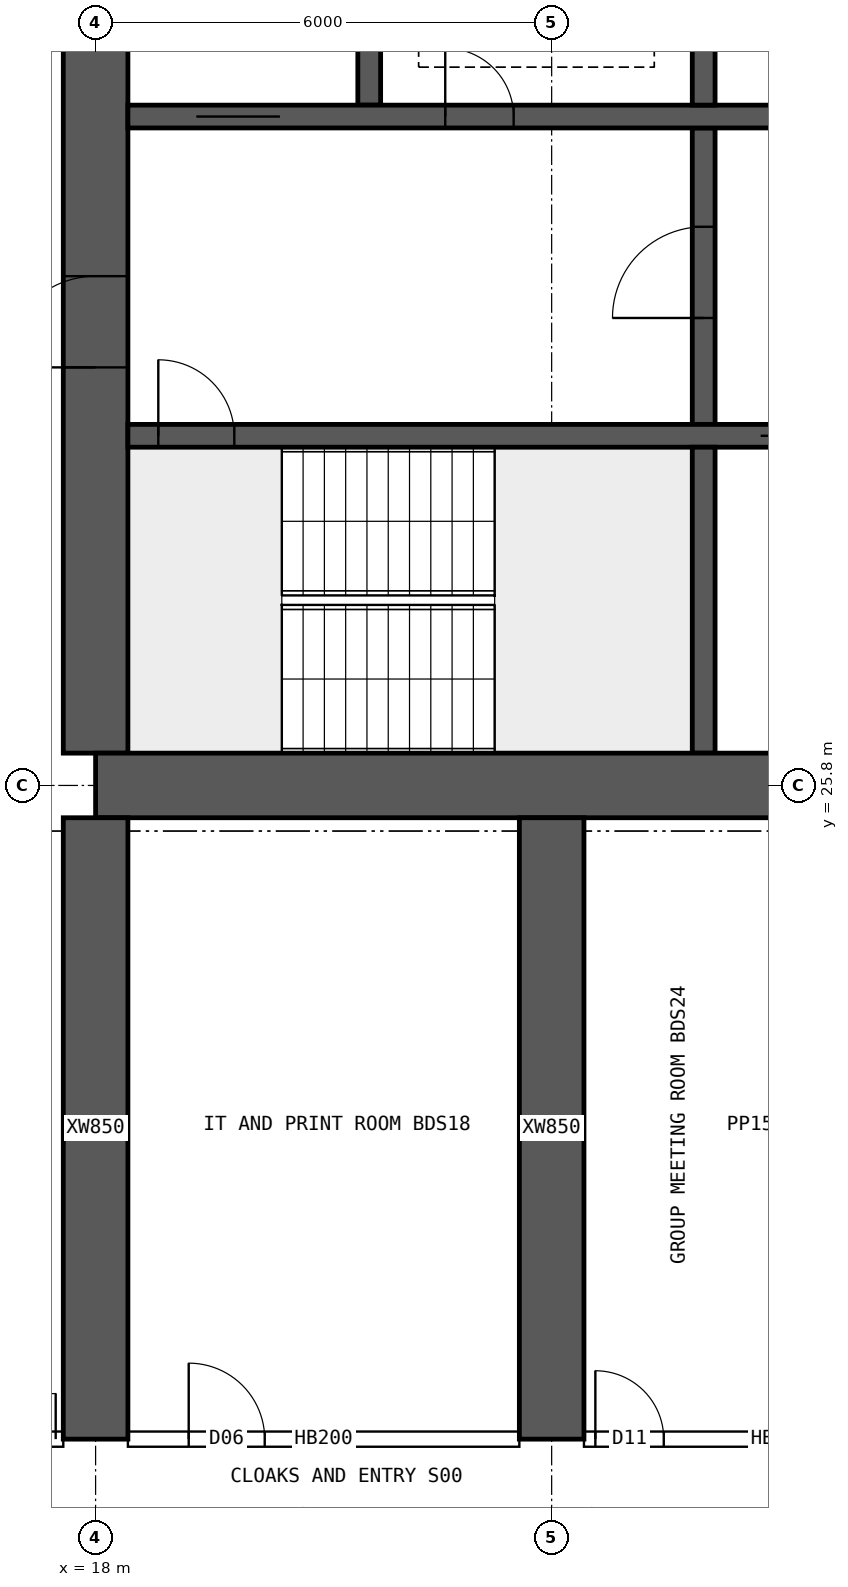
"""IFC4 building model, lengths in metres.
Left out: names, types, materials, properties, quantities, classifications, styles, units other than length and angle.
Written with IfcOpenShell. Run it as: python <this file> out.ifc"""

import sys

from ifc_helpers import new_model, si_unit, direction, frame, frame_2d, origin, place, context, subcontext, project, spatial, rectangle, extrude, element, fill, save


model = new_model("IFC4")
c1 = context("Model", 3, precision=1e-05, world=origin(), true_north=direction((0.0, 1.0)))
c2 = subcontext(c1, "Body", "Model", "MODEL_VIEW")
j1 = project(units=[si_unit("LENGTHUNIT", "METRE"), si_unit("PLANEANGLEUNIT", "RADIAN")], contexts=[c1])
p1 = place(None, origin())
s1 = spatial("IfcSite", under=j1, at=p1, CompositionType="ELEMENT")
p2 = place(p1, origin())
s2 = spatial("IfcBuilding", under=s1, at=p2, CompositionType="ELEMENT")
p3 = place(p2, frame((0.0, 0.0, 163.6)))
s3 = spatial("IfcBuildingStorey", under=s2, at=p3, CompositionType="ELEMENT", Elevation=163.6)
p4 = place(p3, frame((18.0, 25.8, 0.0), z_axis=(0.0, 0.0, 1.0), x_axis=(1.0, 0.0, 0.0)))
e1 = element("IfcWall", 1, at=p4, inside=s3, PredefinedType="SHEAR", context=c2, shape_type="SweptSolid", body=[
    extrude(rectangle(XDim=48.0, YDim=0.85, at=frame_2d((24.0, 0.0))), origin(), (0.0, 0.0, 1.0), 3.75),
])
p5 = place(p3, frame((18.0, 26.225, 0.0), z_axis=(0.0, 0.0, 1.0), x_axis=(0.0, 1.0, 0.0)))
e2 = element("IfcWall", 2, at=p5, inside=s3, PredefinedType="SHEAR", context=c2, shape_type="SweptSolid", body=[
    extrude(rectangle(XDim=11.55, YDim=0.85, at=frame_2d((5.775, 0.0))), origin(), (0.0, 0.0, 1.0), 3.75),
])
p6 = place(p5, frame((5.075, 0.0, 0.0)))
e3 = element("IfcOpeningElement", 3, at=p6, cuts=e2, PredefinedType="OPENING", context=c2, shape_type="SweptSolid", body=[
    extrude(rectangle(XDim=1.2, YDim=2.1, at=frame_2d((0.6, 1.05))), frame((0.0, 0.435, 0.0), z_axis=(0.0, -1.0, 0.0), x_axis=(1.0, 0.0, 0.0)), (0.0, 0.0, 1.0), 0.87),
])
p7 = place(p3, frame((18.425, 30.4, 0.0), z_axis=(0.0, 0.0, 1.0), x_axis=(1.0, 0.0, 0.0)))
e4 = element("IfcWall", 4, at=p7, inside=s3, PredefinedType="SHEAR", context=c2, shape_type="SweptSolid", body=[
    extrude(rectangle(XDim=47.15, YDim=0.3, at=frame_2d((23.575, 0.0))), origin(), (0.0, 0.0, 1.0), 3.75),
])
p8 = place(p7, frame((0.4, 0.0, 0.0)))
e5 = element("IfcOpeningElement", 5, at=p8, cuts=e4, PredefinedType="OPENING", context=c2, shape_type="SweptSolid", body=[
    extrude(rectangle(XDim=1.0, YDim=2.1, at=frame_2d((0.5, 1.05))), frame((0.0, 0.16, 0.0), z_axis=(0.0, -1.0, 0.0), x_axis=(1.0, 0.0, 0.0)), (0.0, 0.0, 1.0), 0.32),
])
p9 = place(p7, frame((45.75, 0.0, 0.0)))
e6 = element("IfcOpeningElement", 6, at=p9, cuts=e4, PredefinedType="OPENING", context=c2, shape_type="SweptSolid", body=[
    extrude(rectangle(XDim=1.0, YDim=2.1, at=frame_2d((0.5, 1.05))), frame((0.0, 0.16, 0.0), z_axis=(0.0, -1.0, 0.0), x_axis=(1.0, 0.0, 0.0)), (0.0, 0.0, 1.0), 0.32),
])
p10 = place(p7, frame((8.325, 0.0, 0.0)))
e7 = element("IfcOpeningElement", 7, at=p10, cuts=e4, PredefinedType="OPENING", context=c2, shape_type="SweptSolid", body=[
    extrude(rectangle(XDim=1.1, YDim=2.1, at=frame_2d((0.55, 1.05))), frame((0.0, 0.16, 0.0), z_axis=(0.0, -1.0, 0.0), x_axis=(1.0, 0.0, 0.0)), (0.0, 0.0, 1.0), 0.32),
])
p11 = place(p7, frame((10.925, 0.0, 0.0)))
e8 = element("IfcOpeningElement", 8, at=p11, cuts=e4, PredefinedType="OPENING", context=c2, shape_type="SweptSolid", body=[
    extrude(rectangle(XDim=1.1, YDim=2.1, at=frame_2d((0.55, 1.05))), frame((0.0, 0.16, 0.0), z_axis=(0.0, -1.0, 0.0), x_axis=(1.0, 0.0, 0.0)), (0.0, 0.0, 1.0), 0.32),
])
p12 = place(p7, frame((13.525, 0.0, 0.0)))
e9 = element("IfcOpeningElement", 9, at=p12, cuts=e4, PredefinedType="OPENING", context=c2, shape_type="SweptSolid", body=[
    extrude(rectangle(XDim=1.1, YDim=2.1, at=frame_2d((0.55, 1.05))), frame((0.0, 0.16, 0.0), z_axis=(0.0, -1.0, 0.0), x_axis=(1.0, 0.0, 0.0)), (0.0, 0.0, 1.0), 0.32),
])
p13 = place(p7, frame((16.125, 0.0, 0.0)))
e10 = element("IfcOpeningElement", 10, at=p13, cuts=e4, PredefinedType="OPENING", context=c2, shape_type="SweptSolid", body=[
    extrude(rectangle(XDim=1.1, YDim=2.1, at=frame_2d((0.55, 1.05))), frame((0.0, 0.16, 0.0), z_axis=(0.0, -1.0, 0.0), x_axis=(1.0, 0.0, 0.0)), (0.0, 0.0, 1.0), 0.32),
])
p14 = place(p7, frame((18.9, 0.0, 0.0)))
e11 = element("IfcOpeningElement", 11, at=p14, cuts=e4, PredefinedType="OPENING", context=c2, shape_type="SweptSolid", body=[
    extrude(rectangle(XDim=0.9, YDim=2.1, at=frame_2d((0.45, 1.05))), frame((0.0, 0.16, 0.0), z_axis=(0.0, -1.0, 0.0), x_axis=(1.0, 0.0, 0.0)), (0.0, 0.0, 1.0), 0.32),
])
p15 = place(p7, frame((30.192, 0.0, 0.0)))
e12 = element("IfcOpeningElement", 12, at=p15, cuts=e4, PredefinedType="OPENING", context=c2, shape_type="SweptSolid", body=[
    extrude(rectangle(XDim=1.1, YDim=2.1, at=frame_2d((0.55, 1.05))), frame((0.0, 0.16, 0.0), z_axis=(0.0, -1.0, 0.0), x_axis=(1.0, 0.0, 0.0)), (0.0, 0.0, 1.0), 0.32),
])
p16 = place(p7, frame((33.725, 0.0, 0.0)))
e13 = element("IfcOpeningElement", 13, at=p16, cuts=e4, PredefinedType="OPENING", context=c2, shape_type="SweptSolid", body=[
    extrude(rectangle(XDim=1.1, YDim=2.1, at=frame_2d((0.55, 1.05))), frame((0.0, 0.16, 0.0), z_axis=(0.0, -1.0, 0.0), x_axis=(1.0, 0.0, 0.0)), (0.0, 0.0, 1.0), 0.32),
])
p17 = place(p7, frame((37.258, 0.0, 0.0)))
e14 = element("IfcOpeningElement", 14, at=p17, cuts=e4, PredefinedType="OPENING", context=c2, shape_type="SweptSolid", body=[
    extrude(rectangle(XDim=1.1, YDim=2.1, at=frame_2d((0.55, 1.05))), frame((0.0, 0.16, 0.0), z_axis=(0.0, -1.0, 0.0), x_axis=(1.0, 0.0, 0.0)), (0.0, 0.0, 1.0), 0.32),
])
p18 = place(p3, frame((18.425, 34.6, 0.0), z_axis=(0.0, 0.0, 1.0), x_axis=(1.0, 0.0, 0.0)))
e15 = element("IfcWall", 15, at=p18, inside=s3, PredefinedType="SHEAR", context=c2, shape_type="SweptSolid", body=[
    extrude(rectangle(XDim=47.15, YDim=0.3, at=frame_2d((23.575, 0.0))), origin(), (0.0, 0.0, 1.0), 3.75),
])
p19 = place(p18, frame((0.9, 0.0, 0.0)))
e16 = element("IfcOpeningElement", 16, at=p19, cuts=e15, PredefinedType="OPENING", context=c2, shape_type="SweptSolid", body=[
    extrude(rectangle(XDim=1.1, YDim=2.1, at=frame_2d((0.55, 1.05))), frame((0.0, 0.16, 0.0), z_axis=(0.0, -1.0, 0.0), x_axis=(1.0, 0.0, 0.0)), (0.0, 0.0, 1.0), 0.32),
])
p20 = place(p18, frame((45.15, 0.0, 0.0)))
e17 = element("IfcOpeningElement", 17, at=p20, cuts=e15, PredefinedType="OPENING", context=c2, shape_type="SweptSolid", body=[
    extrude(rectangle(XDim=1.1, YDim=2.1, at=frame_2d((0.55, 1.05))), frame((0.0, 0.16, 0.0), z_axis=(0.0, -1.0, 0.0), x_axis=(1.0, 0.0, 0.0)), (0.0, 0.0, 1.0), 0.32),
])
p21 = place(p18, frame((4.175, 0.0, 0.0)))
e18 = element("IfcOpeningElement", 18, at=p21, cuts=e15, PredefinedType="OPENING", context=c2, shape_type="SweptSolid", body=[
    extrude(rectangle(XDim=0.9, YDim=2.1, at=frame_2d((0.45, 1.05))), frame((0.0, 0.16, 0.0), z_axis=(0.0, -1.0, 0.0), x_axis=(1.0, 0.0, 0.0)), (0.0, 0.0, 1.0), 0.32),
])
p22 = place(p18, frame((42.075, 0.0, 0.0)))
e19 = element("IfcOpeningElement", 19, at=p22, cuts=e15, PredefinedType="OPENING", context=c2, shape_type="SweptSolid", body=[
    extrude(rectangle(XDim=0.9, YDim=2.1, at=frame_2d((0.45, 1.05))), frame((0.0, 0.16, 0.0), z_axis=(0.0, -1.0, 0.0), x_axis=(1.0, 0.0, 0.0)), (0.0, 0.0, 1.0), 0.32),
])
p23 = place(p18, frame((8.95, 0.0, 0.0)))
e20 = element("IfcOpeningElement", 20, at=p23, cuts=e15, PredefinedType="OPENING", context=c2, shape_type="SweptSolid", body=[
    extrude(rectangle(XDim=0.9, YDim=2.1, at=frame_2d((0.45, 1.05))), frame((0.0, 0.16, 0.0), z_axis=(0.0, -1.0, 0.0), x_axis=(1.0, 0.0, 0.0)), (0.0, 0.0, 1.0), 0.32),
])
p24 = place(p18, frame((12.924, 0.0, 0.0)))
e21 = element("IfcOpeningElement", 21, at=p24, cuts=e15, PredefinedType="OPENING", context=c2, shape_type="SweptSolid", body=[
    extrude(rectangle(XDim=0.9, YDim=2.1, at=frame_2d((0.45, 1.05))), frame((0.0, 0.16, 0.0), z_axis=(0.0, -1.0, 0.0), x_axis=(1.0, 0.0, 0.0)), (0.0, 0.0, 1.0), 0.32),
])
p25 = place(p18, frame((16.571, 0.0, 0.0)))
e22 = element("IfcOpeningElement", 22, at=p25, cuts=e15, PredefinedType="OPENING", context=c2, shape_type="SweptSolid", body=[
    extrude(rectangle(XDim=0.9, YDim=2.1, at=frame_2d((0.45, 1.05))), frame((0.0, 0.16, 0.0), z_axis=(0.0, -1.0, 0.0), x_axis=(1.0, 0.0, 0.0)), (0.0, 0.0, 1.0), 0.32),
])
p26 = place(p18, frame((20.33, 0.0, 0.0)))
e23 = element("IfcOpeningElement", 23, at=p26, cuts=e15, PredefinedType="OPENING", context=c2, shape_type="SweptSolid", body=[
    extrude(rectangle(XDim=0.9, YDim=2.1, at=frame_2d((0.45, 1.05))), frame((0.0, 0.16, 0.0), z_axis=(0.0, -1.0, 0.0), x_axis=(1.0, 0.0, 0.0)), (0.0, 0.0, 1.0), 0.32),
])
p27 = place(p18, frame((24.736, 0.0, 0.0)))
e24 = element("IfcOpeningElement", 24, at=p27, cuts=e15, PredefinedType="OPENING", context=c2, shape_type="SweptSolid", body=[
    extrude(rectangle(XDim=0.9, YDim=2.1, at=frame_2d((0.45, 1.05))), frame((0.0, 0.16, 0.0), z_axis=(0.0, -1.0, 0.0), x_axis=(1.0, 0.0, 0.0)), (0.0, 0.0, 1.0), 0.32),
])
p28 = place(p18, frame((27.533, 0.0, 0.0)))
e25 = element("IfcOpeningElement", 25, at=p28, cuts=e15, PredefinedType="OPENING", context=c2, shape_type="SweptSolid", body=[
    extrude(rectangle(XDim=0.9, YDim=2.1, at=frame_2d((0.45, 1.05))), frame((0.0, 0.16, 0.0), z_axis=(0.0, -1.0, 0.0), x_axis=(1.0, 0.0, 0.0)), (0.0, 0.0, 1.0), 0.32),
])
p29 = place(p18, frame((29.906, 0.0, 0.0)))
e26 = element("IfcOpeningElement", 26, at=p29, cuts=e15, PredefinedType="OPENING", context=c2, shape_type="SweptSolid", body=[
    extrude(rectangle(XDim=0.9, YDim=2.1, at=frame_2d((0.45, 1.05))), frame((0.0, 0.16, 0.0), z_axis=(0.0, -1.0, 0.0), x_axis=(1.0, 0.0, 0.0)), (0.0, 0.0, 1.0), 0.32),
])
p30 = place(p18, frame((33.756, 0.0, 0.0)))
e27 = element("IfcOpeningElement", 27, at=p30, cuts=e15, PredefinedType="OPENING", context=c2, shape_type="SweptSolid", body=[
    extrude(rectangle(XDim=0.9, YDim=2.1, at=frame_2d((0.45, 1.05))), frame((0.0, 0.16, 0.0), z_axis=(0.0, -1.0, 0.0), x_axis=(1.0, 0.0, 0.0)), (0.0, 0.0, 1.0), 0.32),
])
p31 = place(p18, frame((37.504, 0.0, 0.0)))
e28 = element("IfcOpeningElement", 28, at=p31, cuts=e15, PredefinedType="OPENING", context=c2, shape_type="SweptSolid", body=[
    extrude(rectangle(XDim=0.9, YDim=2.1, at=frame_2d((0.45, 1.05))), frame((0.0, 0.16, 0.0), z_axis=(0.0, -1.0, 0.0), x_axis=(1.0, 0.0, 0.0)), (0.0, 0.0, 1.0), 0.32),
])
p32 = place(p3, frame((26.0, 26.225, 0.0), z_axis=(0.0, 0.0, 1.0), x_axis=(0.0, 1.0, 0.0)))
e29 = element("IfcWall", 29, at=p32, inside=s3, PredefinedType="SHEAR", context=c2, shape_type="SweptSolid", body=[
    extrude(rectangle(XDim=4.025, YDim=0.3, at=frame_2d((2.012, 0.0))), origin(), (0.0, 0.0, 1.0), 3.75),
])
p33 = place(p3, frame((26.0, 30.55, 0.0), z_axis=(0.0, 0.0, 1.0), x_axis=(0.0, 1.0, 0.0)))
e30 = element("IfcWall", 30, at=p33, inside=s3, PredefinedType="SHEAR", context=c2, shape_type="SweptSolid", body=[
    extrude(rectangle(XDim=3.9, YDim=0.3, at=frame_2d((1.95, 0.0))), origin(), (0.0, 0.0, 1.0), 3.75),
])
p34 = place(p33, frame((1.4, 0.0, 0.0)))
e31 = element("IfcOpeningElement", 31, at=p34, cuts=e30, PredefinedType="OPENING", context=c2, shape_type="SweptSolid", body=[
    extrude(rectangle(XDim=1.2, YDim=2.1, at=frame_2d((0.6, 1.05))), frame((0.0, 0.16, 0.0), z_axis=(0.0, -1.0, 0.0), x_axis=(1.0, 0.0, 0.0)), (0.0, 0.0, 1.0), 0.32),
])
for number, where, z_axis, x_axis in (
    (32, (21.6, 34.75, 0.0), (0.0, 0.0, 1.0), (0.0, 1.0, 0.0)),
    (33, (26.0, 34.75, 0.0), (0.0, 0.0, 1.0), (0.0, 1.0, 0.0)),
):
    element("IfcWall", number, at=place(p3, frame(where, z_axis=z_axis, x_axis=x_axis)), inside=s3, PredefinedType="SHEAR", context=c2, shape_type="SweptSolid", body=[
        extrude(rectangle(XDim=3.025, YDim=0.3, at=frame_2d((1.512, 0.0))), origin(), (0.0, 0.0, 1.0), 3.75),
    ])
for number, where, z_axis, x_axis in (
    (34, (18.0, 17.2, 0.0), (0.0, 0.0, 1.0), (0.0, 1.0, 0.0)),
    (35, (24.0, 17.2, 0.0), (0.0, 0.0, 1.0), (0.0, 1.0, 0.0)),
):
    element("IfcWall", number, at=place(p3, frame(where, z_axis=z_axis, x_axis=x_axis)), inside=s3, PredefinedType="SHEAR", context=c2, shape_type="SweptSolid", body=[
        extrude(rectangle(XDim=8.175, YDim=0.85, at=frame_2d((4.087, 0.0))), origin(), (0.0, 0.0, 1.0), 3.75),
    ])
p35 = place(p3, frame((15.6, 17.2, 0.0), z_axis=(0.0, 0.0, 1.0), x_axis=(1.0, 0.0, 0.0)))
e36 = element("IfcWall", 36, at=p35, inside=s3, PredefinedType="SOLIDWALL", context=c2, shape_type="SweptSolid", body=[
    extrude(rectangle(XDim=1.975, YDim=0.2, at=frame_2d((0.987, 0.0))), origin(), (0.0, 0.0, 1.0), 3.5),
])
p36 = place(p35, frame((0.675, 0.0, 0.0)))
e37 = element("IfcOpeningElement", 37, at=p36, cuts=e36, PredefinedType="OPENING", context=c2, shape_type="SweptSolid", body=[
    extrude(rectangle(XDim=1.2, YDim=2.1, at=frame_2d((0.6, 1.05))), frame((0.0, 0.11, 0.0), z_axis=(0.0, -1.0, 0.0), x_axis=(1.0, 0.0, 0.0)), (0.0, 0.0, 1.0), 0.22),
])
p37 = place(p3, frame((18.425, 17.2, 0.0), z_axis=(0.0, 0.0, 1.0), x_axis=(1.0, 0.0, 0.0)))
e38 = element("IfcWall", 38, at=p37, inside=s3, PredefinedType="SOLIDWALL", context=c2, shape_type="SweptSolid", body=[
    extrude(rectangle(XDim=5.15, YDim=0.2, at=frame_2d((2.575, 0.0))), origin(), (0.0, 0.0, 1.0), 3.5),
])
p38 = place(p37, frame((0.8, 0.0, 0.0)))
e39 = element("IfcOpeningElement", 39, at=p38, cuts=e38, PredefinedType="OPENING", context=c2, shape_type="SweptSolid", body=[
    extrude(rectangle(XDim=1.0, YDim=2.1, at=frame_2d((0.5, 1.05))), frame((0.0, 0.11, 0.0), z_axis=(0.0, -1.0, 0.0), x_axis=(1.0, 0.0, 0.0)), (0.0, 0.0, 1.0), 0.22),
])
p39 = place(p3, frame((24.425, 17.2, 0.0), z_axis=(0.0, 0.0, 1.0), x_axis=(1.0, 0.0, 0.0)))
e40 = element("IfcWall", 40, at=p39, inside=s3, PredefinedType="SOLIDWALL", context=c2, shape_type="SweptSolid", body=[
    extrude(rectangle(XDim=5.15, YDim=0.2, at=frame_2d((2.575, 0.0))), origin(), (0.0, 0.0, 1.0), 3.5),
])
p40 = place(p39, frame((0.15, 0.0, 0.0)))
e41 = element("IfcOpeningElement", 41, at=p40, cuts=e40, PredefinedType="OPENING", context=c2, shape_type="SweptSolid", body=[
    extrude(rectangle(XDim=0.9, YDim=2.1, at=frame_2d((0.45, 1.05))), frame((0.0, 0.11, 0.0), z_axis=(0.0, -1.0, 0.0), x_axis=(1.0, 0.0, 0.0)), (0.0, 0.0, 1.0), 0.22),
])
p41 = place(p39, frame((3.375, 0.0, 0.0)))
e42 = element("IfcOpeningElement", 42, at=p41, cuts=e40, PredefinedType="OPENING", context=c2, shape_type="SweptSolid", body=[
    extrude(rectangle(XDim=0.9, YDim=2.1, at=frame_2d((0.45, 1.05))), frame((0.0, 0.11, 0.0), z_axis=(0.0, -1.0, 0.0), x_axis=(1.0, 0.0, 0.0)), (0.0, 0.0, 1.0), 0.22),
])
p42 = place(p6, origin())
e43 = element("IfcDoor", 43, at=p42, inside=s3, OperationType="SINGLE_SWING_LEFT", PredefinedType="DOOR", context=c2, shape_type="SweptSolid", body=[
    extrude(rectangle(XDim=1.2, YDim=2.1, at=frame_2d((0.6, 1.05))), frame((0.0, 0.025, 0.0), z_axis=(0.0, -1.0, 0.0), x_axis=(1.0, 0.0, 0.0)), (0.0, 0.0, 1.0), 0.05),
])
fill(e3, e43)
p43 = place(p8, origin())
e44 = element("IfcDoor", 44, at=p43, inside=s3, OperationType="SINGLE_SWING_LEFT", PredefinedType="DOOR", context=c2, shape_type="SweptSolid", body=[
    extrude(rectangle(XDim=1.0, YDim=2.1, at=frame_2d((0.5, 1.05))), frame((0.0, 0.025, 0.0), z_axis=(0.0, -1.0, 0.0), x_axis=(1.0, 0.0, 0.0)), (0.0, 0.0, 1.0), 0.05),
])
fill(e5, e44)
p44 = place(p19, origin())
e45 = element("IfcDoor", 45, at=p44, inside=s3, OperationType="DOUBLE_DOOR_SLIDING", PredefinedType="DOOR", context=c2, shape_type="SweptSolid", body=[
    extrude(rectangle(XDim=1.1, YDim=2.1, at=frame_2d((0.55, 1.05))), frame((0.0, 0.025, 0.0), z_axis=(0.0, -1.0, 0.0), x_axis=(1.0, 0.0, 0.0)), (0.0, 0.0, 1.0), 0.05),
])
fill(e16, e45)
p45 = place(p21, origin())
e46 = element("IfcDoor", 46, at=p45, inside=s3, OperationType="SINGLE_SWING_LEFT", PredefinedType="DOOR", context=c2, shape_type="SweptSolid", body=[
    extrude(rectangle(XDim=0.9, YDim=2.1, at=frame_2d((0.45, 1.05))), frame((0.0, 0.025, 0.0), z_axis=(0.0, -1.0, 0.0), x_axis=(1.0, 0.0, 0.0)), (0.0, 0.0, 1.0), 0.05),
])
fill(e18, e46)
p46 = place(p34, origin())
e47 = element("IfcDoor", 47, at=p46, inside=s3, OperationType="SINGLE_SWING_LEFT", PredefinedType="DOOR", context=c2, shape_type="SweptSolid", body=[
    extrude(rectangle(XDim=1.2, YDim=2.1, at=frame_2d((0.6, 1.05))), frame((0.0, 0.025, 0.0), z_axis=(0.0, -1.0, 0.0), x_axis=(1.0, 0.0, 0.0)), (0.0, 0.0, 1.0), 0.05),
])
fill(e31, e47)
p47 = place(p10, origin())
e48 = element("IfcDoor", 48, at=p47, inside=s3, OperationType="DOUBLE_DOOR_SLIDING", PredefinedType="DOOR", context=c2, shape_type="SweptSolid", body=[
    extrude(rectangle(XDim=1.1, YDim=2.1, at=frame_2d((0.55, 1.05))), frame((0.0, 0.025, 0.0), z_axis=(0.0, -1.0, 0.0), x_axis=(1.0, 0.0, 0.0)), (0.0, 0.0, 1.0), 0.05),
])
fill(e7, e48)
p48 = place(p36, origin())
e49 = element("IfcDoor", 49, at=p48, inside=s3, OperationType="DOUBLE_DOOR_SINGLE_SWING", PredefinedType="DOOR", context=c2, shape_type="SweptSolid", body=[
    extrude(rectangle(XDim=1.2, YDim=2.1, at=frame_2d((0.6, 1.05))), frame((0.0, 0.025, 0.0), z_axis=(0.0, -1.0, 0.0), x_axis=(1.0, 0.0, 0.0)), (0.0, 0.0, 1.0), 0.05),
])
fill(e37, e49)
p49 = place(p38, origin())
e50 = element("IfcDoor", 50, at=p49, inside=s3, OperationType="SINGLE_SWING_LEFT", PredefinedType="DOOR", context=c2, shape_type="SweptSolid", body=[
    extrude(rectangle(XDim=1.0, YDim=2.1, at=frame_2d((0.5, 1.05))), frame((0.0, 0.025, 0.0), z_axis=(0.0, -1.0, 0.0), x_axis=(1.0, 0.0, 0.0)), (0.0, 0.0, 1.0), 0.05),
])
fill(e39, e50)
p50 = place(p40, origin())
e51 = element("IfcDoor", 51, at=p50, inside=s3, OperationType="SINGLE_SWING_LEFT", PredefinedType="DOOR", context=c2, shape_type="SweptSolid", body=[
    extrude(rectangle(XDim=0.9, YDim=2.1, at=frame_2d((0.45, 1.05))), frame((0.0, 0.025, 0.0), z_axis=(0.0, -1.0, 0.0), x_axis=(1.0, 0.0, 0.0)), (0.0, 0.0, 1.0), 0.05),
])
fill(e41, e51)
save(model, sys.argv[1])
